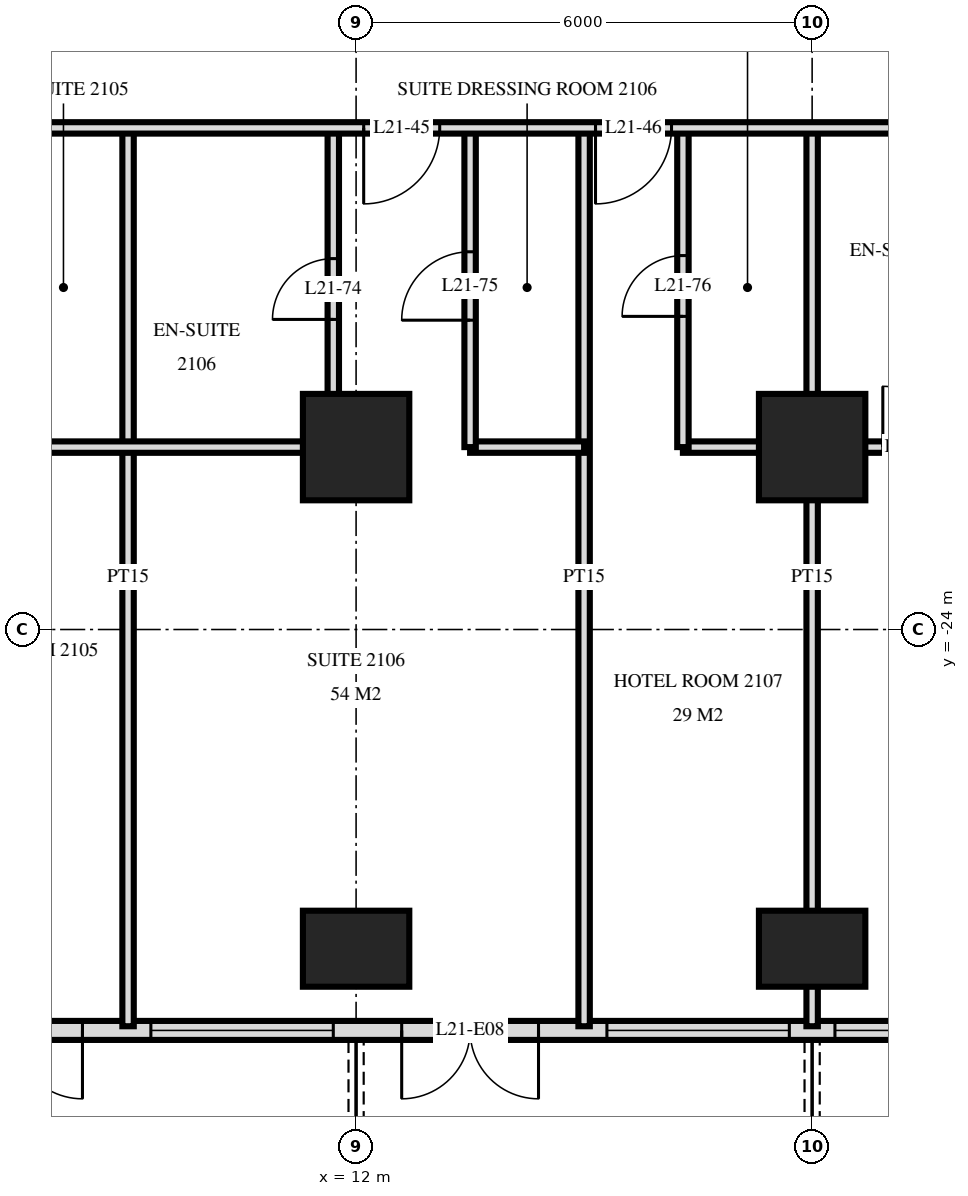
"""IFC4 building model, lengths in metres.
Left out: names, types, materials, properties, quantities, classifications, styles, units other than length and angle.
Written with IfcOpenShell. Run it as: python <this file> out.ifc"""

import sys

from ifc_helpers import new_model, si_unit, direction, frame, frame_2d, origin, origin_2d, place, context, subcontext, project, spatial, rectangle, extrude, element, fill, save


model = new_model("IFC4")
c1 = context("Model", 3, precision=1e-05, world=origin(), true_north=direction((0.0, 1.0)))
c2 = subcontext(c1, "Body", "Model", "MODEL_VIEW")
j1 = project(units=[si_unit("LENGTHUNIT", "METRE"), si_unit("PLANEANGLEUNIT", "RADIAN")], contexts=[c1])
p1 = place(None, origin())
s1 = spatial("IfcSite", under=j1, at=p1, CompositionType="ELEMENT")
p2 = place(p1, origin())
s2 = spatial("IfcBuilding", under=s1, at=p2, CompositionType="ELEMENT")
p3 = place(p2, frame((0.0, 0.0, 85.2)))
s3 = spatial("IfcBuildingStorey", under=s2, at=p3, CompositionType="ELEMENT", Elevation=85.2)
p4 = place(p3, frame((12.0, -28.2, 0.0), z_axis=(0.0, 0.0, 1.0), x_axis=(1.0, 0.0, 0.0)))
e1 = element("IfcColumn", 1, at=p4, inside=s3, PredefinedType="COLUMN", context=c2, shape_type="SweptSolid", body=[
    extrude(rectangle(XDim=1.4, YDim=1.0, at=origin_2d()), origin(), (0.0, 0.0, 1.0), 3.6),
])
p5 = place(p3, frame((12.0, -21.6, 0.0), z_axis=(0.0, 0.0, 1.0), x_axis=(1.0, 0.0, 0.0)))
e2 = element("IfcColumn", 2, at=p5, inside=s3, PredefinedType="COLUMN", context=c2, shape_type="SweptSolid", body=[
    extrude(rectangle(XDim=1.4, YDim=1.4, at=origin_2d()), origin(), (0.0, 0.0, 1.0), 3.6),
])
p6 = place(p3, frame((18.0, -28.2, 0.0), z_axis=(0.0, 0.0, 1.0), x_axis=(1.0, 0.0, 0.0)))
e3 = element("IfcColumn", 3, at=p6, inside=s3, PredefinedType="COLUMN", context=c2, shape_type="SweptSolid", body=[
    extrude(rectangle(XDim=1.4, YDim=1.0, at=origin_2d()), origin(), (0.0, 0.0, 1.0), 3.6),
])
p7 = place(p3, frame((18.0, -21.6, 0.0), z_axis=(0.0, 0.0, 1.0), x_axis=(1.0, 0.0, 0.0)))
e4 = element("IfcColumn", 4, at=p7, inside=s3, PredefinedType="COLUMN", context=c2, shape_type="SweptSolid", body=[
    extrude(rectangle(XDim=1.4, YDim=1.4, at=origin_2d()), origin(), (0.0, 0.0, 1.0), 3.6),
])
p8 = place(p3, frame((-28.775, -29.275, 0.0), z_axis=(0.0, 0.0, 1.0), x_axis=(1.0, 0.0, 0.0)))
e5 = element("IfcWall", 5, at=p8, inside=s3, PredefinedType="SOLIDWALL", context=c2, shape_type="SweptSolid", body=[
    extrude(rectangle(XDim=57.551, YDim=0.25, at=frame_2d((28.775, 0.0))), origin(), (0.0, 0.0, 1.0), 3.32),
])
p9 = place(p8, frame((0.575, 0.0, 0.0)))
e6 = element("IfcOpeningElement", 6, at=p9, cuts=e5, PredefinedType="OPENING", context=c2, shape_type="SweptSolid", body=[
    extrude(rectangle(XDim=1.8, YDim=2.4, at=frame_2d((0.9, 1.2))), frame((0.0, 0.135, 0.0), z_axis=(0.0, -1.0, 0.0), x_axis=(1.0, 0.0, 0.0)), (0.0, 0.0, 1.0), 0.27),
])
p10 = place(p8, frame((5.375, 0.0, 0.0)))
e7 = element("IfcOpeningElement", 7, at=p10, cuts=e5, PredefinedType="OPENING", context=c2, shape_type="SweptSolid", body=[
    extrude(rectangle(XDim=1.8, YDim=2.4, at=frame_2d((0.9, 1.2))), frame((0.0, 0.135, 0.0), z_axis=(0.0, -1.0, 0.0), x_axis=(1.0, 0.0, 0.0)), (0.0, 0.0, 1.0), 0.27),
])
p11 = place(p8, frame((8.075, 0.0, 0.3)))
e8 = element("IfcOpeningElement", 8, at=p11, cuts=e5, PredefinedType="OPENING", context=c2, shape_type="SweptSolid", body=[
    extrude(rectangle(XDim=2.4, YDim=2.1, at=frame_2d((1.2, 1.05))), frame((0.0, 0.135, 0.0), z_axis=(0.0, -1.0, 0.0), x_axis=(1.0, 0.0, 0.0)), (0.0, 0.0, 1.0), 0.27),
])
p12 = place(p8, frame((11.375, 0.0, 0.0)))
e9 = element("IfcOpeningElement", 9, at=p12, cuts=e5, PredefinedType="OPENING", context=c2, shape_type="SweptSolid", body=[
    extrude(rectangle(XDim=1.8, YDim=2.4, at=frame_2d((0.9, 1.2))), frame((0.0, 0.135, 0.0), z_axis=(0.0, -1.0, 0.0), x_axis=(1.0, 0.0, 0.0)), (0.0, 0.0, 1.0), 0.27),
])
p13 = place(p8, frame((14.075, 0.0, 0.3)))
e10 = element("IfcOpeningElement", 10, at=p13, cuts=e5, PredefinedType="OPENING", context=c2, shape_type="SweptSolid", body=[
    extrude(rectangle(XDim=2.4, YDim=2.1, at=frame_2d((1.2, 1.05))), frame((0.0, 0.135, 0.0), z_axis=(0.0, -1.0, 0.0), x_axis=(1.0, 0.0, 0.0)), (0.0, 0.0, 1.0), 0.27),
])
p14 = place(p8, frame((17.075, 0.0, 0.3)))
e11 = element("IfcOpeningElement", 11, at=p14, cuts=e5, PredefinedType="OPENING", context=c2, shape_type="SweptSolid", body=[
    extrude(rectangle(XDim=2.4, YDim=2.1, at=frame_2d((1.2, 1.05))), frame((0.0, 0.135, 0.0), z_axis=(0.0, -1.0, 0.0), x_axis=(1.0, 0.0, 0.0)), (0.0, 0.0, 1.0), 0.27),
])
p15 = place(p8, frame((20.375, 0.0, 0.0)))
e12 = element("IfcOpeningElement", 12, at=p15, cuts=e5, PredefinedType="OPENING", context=c2, shape_type="SweptSolid", body=[
    extrude(rectangle(XDim=1.8, YDim=2.4, at=frame_2d((0.9, 1.2))), frame((0.0, 0.135, 0.0), z_axis=(0.0, -1.0, 0.0), x_axis=(1.0, 0.0, 0.0)), (0.0, 0.0, 1.0), 0.27),
])
p16 = place(p8, frame((23.375, 0.0, 0.0)))
e13 = element("IfcOpeningElement", 13, at=p16, cuts=e5, PredefinedType="OPENING", context=c2, shape_type="SweptSolid", body=[
    extrude(rectangle(XDim=1.8, YDim=2.4, at=frame_2d((0.9, 1.2))), frame((0.0, 0.135, 0.0), z_axis=(0.0, -1.0, 0.0), x_axis=(1.0, 0.0, 0.0)), (0.0, 0.0, 1.0), 0.27),
])
p17 = place(p8, frame((26.075, 0.0, 0.3)))
e14 = element("IfcOpeningElement", 14, at=p17, cuts=e5, PredefinedType="OPENING", context=c2, shape_type="SweptSolid", body=[
    extrude(rectangle(XDim=2.4, YDim=2.1, at=frame_2d((1.2, 1.05))), frame((0.0, 0.135, 0.0), z_axis=(0.0, -1.0, 0.0), x_axis=(1.0, 0.0, 0.0)), (0.0, 0.0, 1.0), 0.27),
])
p18 = place(p8, frame((29.375, 0.0, 0.0)))
e15 = element("IfcOpeningElement", 15, at=p18, cuts=e5, PredefinedType="OPENING", context=c2, shape_type="SweptSolid", body=[
    extrude(rectangle(XDim=1.8, YDim=2.4, at=frame_2d((0.9, 1.2))), frame((0.0, 0.135, 0.0), z_axis=(0.0, -1.0, 0.0), x_axis=(1.0, 0.0, 0.0)), (0.0, 0.0, 1.0), 0.27),
])
p19 = place(p8, frame((32.075, 0.0, 0.3)))
e16 = element("IfcOpeningElement", 16, at=p19, cuts=e5, PredefinedType="OPENING", context=c2, shape_type="SweptSolid", body=[
    extrude(rectangle(XDim=2.4, YDim=2.1, at=frame_2d((1.2, 1.05))), frame((0.0, 0.135, 0.0), z_axis=(0.0, -1.0, 0.0), x_axis=(1.0, 0.0, 0.0)), (0.0, 0.0, 1.0), 0.27),
])
p20 = place(p8, frame((35.375, 0.0, 0.0)))
e17 = element("IfcOpeningElement", 17, at=p20, cuts=e5, PredefinedType="OPENING", context=c2, shape_type="SweptSolid", body=[
    extrude(rectangle(XDim=1.8, YDim=2.4, at=frame_2d((0.9, 1.2))), frame((0.0, 0.135, 0.0), z_axis=(0.0, -1.0, 0.0), x_axis=(1.0, 0.0, 0.0)), (0.0, 0.0, 1.0), 0.27),
])
p21 = place(p8, frame((38.075, 0.0, 0.3)))
e18 = element("IfcOpeningElement", 18, at=p21, cuts=e5, PredefinedType="OPENING", context=c2, shape_type="SweptSolid", body=[
    extrude(rectangle(XDim=2.4, YDim=2.1, at=frame_2d((1.2, 1.05))), frame((0.0, 0.135, 0.0), z_axis=(0.0, -1.0, 0.0), x_axis=(1.0, 0.0, 0.0)), (0.0, 0.0, 1.0), 0.27),
])
p22 = place(p8, frame((41.375, 0.0, 0.0)))
e19 = element("IfcOpeningElement", 19, at=p22, cuts=e5, PredefinedType="OPENING", context=c2, shape_type="SweptSolid", body=[
    extrude(rectangle(XDim=1.8, YDim=2.4, at=frame_2d((0.9, 1.2))), frame((0.0, 0.135, 0.0), z_axis=(0.0, -1.0, 0.0), x_axis=(1.0, 0.0, 0.0)), (0.0, 0.0, 1.0), 0.27),
])
p23 = place(p8, frame((44.075, 0.0, 0.3)))
e20 = element("IfcOpeningElement", 20, at=p23, cuts=e5, PredefinedType="OPENING", context=c2, shape_type="SweptSolid", body=[
    extrude(rectangle(XDim=2.4, YDim=2.1, at=frame_2d((1.2, 1.05))), frame((0.0, 0.135, 0.0), z_axis=(0.0, -1.0, 0.0), x_axis=(1.0, 0.0, 0.0)), (0.0, 0.0, 1.0), 0.27),
])
p24 = place(p8, frame((47.075, 0.0, 0.3)))
e21 = element("IfcOpeningElement", 21, at=p24, cuts=e5, PredefinedType="OPENING", context=c2, shape_type="SweptSolid", body=[
    extrude(rectangle(XDim=2.4, YDim=2.1, at=frame_2d((1.2, 1.05))), frame((0.0, 0.135, 0.0), z_axis=(0.0, -1.0, 0.0), x_axis=(1.0, 0.0, 0.0)), (0.0, 0.0, 1.0), 0.27),
])
p25 = place(p8, frame((50.375, 0.0, 0.0)))
e22 = element("IfcOpeningElement", 22, at=p25, cuts=e5, PredefinedType="OPENING", context=c2, shape_type="SweptSolid", body=[
    extrude(rectangle(XDim=1.8, YDim=2.4, at=frame_2d((0.9, 1.2))), frame((0.0, 0.135, 0.0), z_axis=(0.0, -1.0, 0.0), x_axis=(1.0, 0.0, 0.0)), (0.0, 0.0, 1.0), 0.27),
])
p26 = place(p8, frame((53.375, 0.0, 0.0)))
e23 = element("IfcOpeningElement", 23, at=p26, cuts=e5, PredefinedType="OPENING", context=c2, shape_type="SweptSolid", body=[
    extrude(rectangle(XDim=1.8, YDim=2.4, at=frame_2d((0.9, 1.2))), frame((0.0, 0.135, 0.0), z_axis=(0.0, -1.0, 0.0), x_axis=(1.0, 0.0, 0.0)), (0.0, 0.0, 1.0), 0.27),
])
p27 = place(p3, frame((18.0, -29.22, 0.0), z_axis=(0.0, 0.0, 1.0), x_axis=(0.0, 1.0, 0.0)))
e24 = element("IfcWall", 24, at=p27, inside=s3, PredefinedType="PARTITIONING", context=c2, shape_type="SweptSolid", body=[
    extrude(rectangle(XDim=11.82, YDim=0.15, at=frame_2d((5.91, 0.0))), origin(), (0.0, 0.0, 1.0), 3.32),
])
p28 = place(p3, frame((16.3, -21.6, 0.0), z_axis=(0.0, 0.0, 1.0), x_axis=(0.0, 1.0, 0.0)))
e25 = element("IfcWall", 25, at=p28, inside=s3, PredefinedType="PARTITIONING", context=c2, shape_type="SweptSolid", body=[
    extrude(rectangle(XDim=4.2, YDim=0.15, at=frame_2d((2.1, 0.0))), origin(), (0.0, 0.0, 1.0), 3.32),
])
p29 = place(p28, frame((1.72, 0.0, 0.0)))
e26 = element("IfcOpeningElement", 26, at=p29, cuts=e25, PredefinedType="OPENING", context=c2, shape_type="SweptSolid", body=[
    extrude(rectangle(XDim=0.8, YDim=2.1, at=frame_2d((0.4, 1.05))), frame((0.0, 0.085, 0.0), z_axis=(0.0, -1.0, 0.0), x_axis=(1.0, 0.0, 0.0)), (0.0, 0.0, 1.0), 0.17),
])
p30 = place(p3, frame((15.0, -29.22, 0.0), z_axis=(0.0, 0.0, 1.0), x_axis=(0.0, 1.0, 0.0)))
e27 = element("IfcWall", 27, at=p30, inside=s3, PredefinedType="PARTITIONING", context=c2, shape_type="SweptSolid", body=[
    extrude(rectangle(XDim=11.82, YDim=0.15, at=frame_2d((5.91, 0.0))), origin(), (0.0, 0.0, 1.0), 3.32),
])
p31 = place(p3, frame((13.5, -21.6, 0.0), z_axis=(0.0, 0.0, 1.0), x_axis=(0.0, 1.0, 0.0)))
e28 = element("IfcWall", 28, at=p31, inside=s3, PredefinedType="PARTITIONING", context=c2, shape_type="SweptSolid", body=[
    extrude(rectangle(XDim=4.2, YDim=0.15, at=frame_2d((2.1, 0.0))), origin(), (0.0, 0.0, 1.0), 3.32),
])
p32 = place(p31, frame((1.67, 0.0, 0.0)))
e29 = element("IfcOpeningElement", 29, at=p32, cuts=e28, PredefinedType="OPENING", context=c2, shape_type="SweptSolid", body=[
    extrude(rectangle(XDim=0.9, YDim=2.1, at=frame_2d((0.45, 1.05))), frame((0.0, 0.085, 0.0), z_axis=(0.0, -1.0, 0.0), x_axis=(1.0, 0.0, 0.0)), (0.0, 0.0, 1.0), 0.17),
])
p33 = place(p3, frame((11.7, -21.6, 0.0), z_axis=(0.0, 0.0, 1.0), x_axis=(0.0, 1.0, 0.0)))
e30 = element("IfcWall", 30, at=p33, inside=s3, PredefinedType="PARTITIONING", context=c2, shape_type="SweptSolid", body=[
    extrude(rectangle(XDim=4.2, YDim=0.15, at=frame_2d((2.1, 0.0))), origin(), (0.0, 0.0, 1.0), 3.32),
])
p34 = place(p33, frame((1.68, 0.0, 0.0)))
e31 = element("IfcOpeningElement", 31, at=p34, cuts=e30, PredefinedType="OPENING", context=c2, shape_type="SweptSolid", body=[
    extrude(rectangle(XDim=0.8, YDim=2.1, at=frame_2d((0.4, 1.05))), frame((0.0, 0.085, 0.0), z_axis=(0.0, -1.0, 0.0), x_axis=(1.0, 0.0, 0.0)), (0.0, 0.0, 1.0), 0.17),
])
p35 = place(p3, frame((9.0, -29.22, 0.0), z_axis=(0.0, 0.0, 1.0), x_axis=(0.0, 1.0, 0.0)))
e32 = element("IfcWall", 32, at=p35, inside=s3, PredefinedType="PARTITIONING", context=c2, shape_type="SweptSolid", body=[
    extrude(rectangle(XDim=11.82, YDim=0.15, at=frame_2d((5.91, 0.0))), origin(), (0.0, 0.0, 1.0), 3.32),
])
p36 = place(p3, frame((7.3, -21.6, 0.0), z_axis=(0.0, 0.0, 1.0), x_axis=(1.0, 0.0, 0.0)))
e33 = element("IfcWall", 33, at=p36, inside=s3, PredefinedType="PARTITIONING", context=c2, shape_type="SweptSolid", body=[
    extrude(rectangle(XDim=4.4, YDim=0.15, at=frame_2d((2.2, 0.0))), origin(), (0.0, 0.0, 1.0), 3.32),
])
p37 = place(p3, frame((13.5, -21.6, 0.0), z_axis=(0.0, 0.0, 1.0), x_axis=(1.0, 0.0, 0.0)))
e34 = element("IfcWall", 34, at=p37, inside=s3, PredefinedType="PARTITIONING", context=c2, shape_type="SweptSolid", body=[
    extrude(rectangle(XDim=1.5, YDim=0.15, at=frame_2d((0.75, 0.0))), origin(), (0.0, 0.0, 1.0), 3.32),
])
p38 = place(p3, frame((16.3, -21.6, 0.0), z_axis=(0.0, 0.0, 1.0), x_axis=(1.0, 0.0, 0.0)))
e35 = element("IfcWall", 35, at=p38, inside=s3, PredefinedType="PARTITIONING", context=c2, shape_type="SweptSolid", body=[
    extrude(rectangle(XDim=5.9, YDim=0.15, at=frame_2d((2.95, 0.0))), origin(), (0.0, 0.0, 1.0), 3.32),
])
p39 = place(p38, frame((2.63, 0.0, 0.0)))
e36 = element("IfcOpeningElement", 36, at=p39, cuts=e35, PredefinedType="OPENING", context=c2, shape_type="SweptSolid", body=[
    extrude(rectangle(XDim=0.8, YDim=2.1, at=frame_2d((0.4, 1.05))), frame((0.0, 0.085, 0.0), z_axis=(0.0, -1.0, 0.0), x_axis=(1.0, 0.0, 0.0)), (0.0, 0.0, 1.0), 0.17),
])
p40 = place(p3, frame((-33.12, -17.4, 0.0), z_axis=(0.0, 0.0, 1.0), x_axis=(1.0, 0.0, 0.0)))
e37 = element("IfcWall", 37, at=p40, inside=s3, PredefinedType="PARTITIONING", context=c2, shape_type="SweptSolid", body=[
    extrude(rectangle(XDim=66.24, YDim=0.15, at=frame_2d((33.12, 0.0))), origin(), (0.0, 0.0, 1.0), 3.32),
])
p41 = place(p40, frame((10.27, 0.0, 0.0)))
e38 = element("IfcOpeningElement", 38, at=p41, cuts=e37, PredefinedType="OPENING", context=c2, shape_type="SweptSolid", body=[
    extrude(rectangle(XDim=1.0, YDim=2.1, at=frame_2d((0.5, 1.05))), frame((0.0, 0.085, 0.0), z_axis=(0.0, -1.0, 0.0), x_axis=(1.0, 0.0, 0.0)), (0.0, 0.0, 1.0), 0.17),
])
p42 = place(p40, frame((16.97, 0.0, 0.0)))
e39 = element("IfcOpeningElement", 39, at=p42, cuts=e37, PredefinedType="OPENING", context=c2, shape_type="SweptSolid", body=[
    extrude(rectangle(XDim=1.0, YDim=2.1, at=frame_2d((0.5, 1.05))), frame((0.0, 0.085, 0.0), z_axis=(0.0, -1.0, 0.0), x_axis=(1.0, 0.0, 0.0)), (0.0, 0.0, 1.0), 0.17),
])
p43 = place(p40, frame((28.42, 0.0, 0.0)))
e40 = element("IfcOpeningElement", 40, at=p43, cuts=e37, PredefinedType="OPENING", context=c2, shape_type="SweptSolid", body=[
    extrude(rectangle(XDim=1.0, YDim=2.1, at=frame_2d((0.5, 1.05))), frame((0.0, 0.085, 0.0), z_axis=(0.0, -1.0, 0.0), x_axis=(1.0, 0.0, 0.0)), (0.0, 0.0, 1.0), 0.17),
])
p44 = place(p40, frame((30.82, 0.0, 0.0)))
e41 = element("IfcOpeningElement", 41, at=p44, cuts=e37, PredefinedType="OPENING", context=c2, shape_type="SweptSolid", body=[
    extrude(rectangle(XDim=1.0, YDim=2.1, at=frame_2d((0.5, 1.05))), frame((0.0, 0.085, 0.0), z_axis=(0.0, -1.0, 0.0), x_axis=(1.0, 0.0, 0.0)), (0.0, 0.0, 1.0), 0.17),
])
p45 = place(p40, frame((39.27, 0.0, 0.0)))
e42 = element("IfcOpeningElement", 42, at=p45, cuts=e37, PredefinedType="OPENING", context=c2, shape_type="SweptSolid", body=[
    extrude(rectangle(XDim=1.0, YDim=2.1, at=frame_2d((0.5, 1.05))), frame((0.0, 0.085, 0.0), z_axis=(0.0, -1.0, 0.0), x_axis=(1.0, 0.0, 0.0)), (0.0, 0.0, 1.0), 0.17),
])
p46 = place(p40, frame((45.22, 0.0, 0.0)))
e43 = element("IfcOpeningElement", 43, at=p46, cuts=e37, PredefinedType="OPENING", context=c2, shape_type="SweptSolid", body=[
    extrude(rectangle(XDim=1.0, YDim=2.1, at=frame_2d((0.5, 1.05))), frame((0.0, 0.085, 0.0), z_axis=(0.0, -1.0, 0.0), x_axis=(1.0, 0.0, 0.0)), (0.0, 0.0, 1.0), 0.17),
])
p47 = place(p40, frame((48.27, 0.0, 0.0)))
e44 = element("IfcOpeningElement", 44, at=p47, cuts=e37, PredefinedType="OPENING", context=c2, shape_type="SweptSolid", body=[
    extrude(rectangle(XDim=1.0, YDim=2.1, at=frame_2d((0.5, 1.05))), frame((0.0, 0.085, 0.0), z_axis=(0.0, -1.0, 0.0), x_axis=(1.0, 0.0, 0.0)), (0.0, 0.0, 1.0), 0.17),
])
p48 = place(p40, frame((1.87, 0.0, 0.0)))
e45 = element("IfcOpeningElement", 45, at=p48, cuts=e37, PredefinedType="OPENING", context=c2, shape_type="SweptSolid", body=[
    extrude(rectangle(XDim=1.0, YDim=2.1, at=frame_2d((0.5, 1.05))), frame((0.0, 0.085, 0.0), z_axis=(0.0, -1.0, 0.0), x_axis=(1.0, 0.0, 0.0)), (0.0, 0.0, 1.0), 0.17),
])
p49 = place(p40, frame((60.37, 0.0, 0.0)))
e46 = element("IfcOpeningElement", 46, at=p49, cuts=e37, PredefinedType="OPENING", context=c2, shape_type="SweptSolid", body=[
    extrude(rectangle(XDim=1.0, YDim=2.1, at=frame_2d((0.5, 1.05))), frame((0.0, 0.085, 0.0), z_axis=(0.0, -1.0, 0.0), x_axis=(1.0, 0.0, 0.0)), (0.0, 0.0, 1.0), 0.17),
])
p50 = place(p20, frame((0.9, 0.0, 0.0), z_axis=(0.0, 0.0, 1.0), x_axis=(-1.0, 0.0, 0.0)))
e47 = element("IfcDoor", 47, at=p50, inside=s3, OperationType="DOUBLE_DOOR_SINGLE_SWING", PredefinedType="DOOR", context=c2, shape_type="SweptSolid", body=[
    extrude(rectangle(XDim=1.8, YDim=2.4, at=frame_2d((0.0, 1.2))), frame((0.0, -0.025, 0.0), z_axis=(0.0, 1.0, 0.0), x_axis=(-1.0, 0.0, 0.0)), (0.0, 0.0, 1.0), 0.05),
])
fill(e17, e47)
p51 = place(p21, origin())
e48 = element("IfcWindow", 48, at=p51, inside=s3, PartitioningType="SINGLE_PANEL", PredefinedType="WINDOW", context=c2, shape_type="SweptSolid", body=[
    extrude(rectangle(XDim=2.4, YDim=2.1, at=frame_2d((1.2, 1.05))), frame((0.0, 0.03, 0.0), z_axis=(0.0, -1.0, 0.0), x_axis=(1.0, 0.0, 0.0)), (0.0, 0.0, 1.0), 0.06),
])
fill(e18, e48)
p52 = place(p22, frame((0.9, 0.0, 0.0), z_axis=(0.0, 0.0, 1.0), x_axis=(-1.0, 0.0, 0.0)))
e49 = element("IfcDoor", 49, at=p52, inside=s3, OperationType="DOUBLE_DOOR_SINGLE_SWING", PredefinedType="DOOR", context=c2, shape_type="SweptSolid", body=[
    extrude(rectangle(XDim=1.8, YDim=2.4, at=frame_2d((0.0, 1.2))), frame((0.0, -0.025, 0.0), z_axis=(0.0, 1.0, 0.0), x_axis=(-1.0, 0.0, 0.0)), (0.0, 0.0, 1.0), 0.05),
])
fill(e19, e49)
p53 = place(p23, origin())
e50 = element("IfcWindow", 50, at=p53, inside=s3, PartitioningType="SINGLE_PANEL", PredefinedType="WINDOW", context=c2, shape_type="SweptSolid", body=[
    extrude(rectangle(XDim=2.4, YDim=2.1, at=frame_2d((1.2, 1.05))), frame((0.0, 0.03, 0.0), z_axis=(0.0, -1.0, 0.0), x_axis=(1.0, 0.0, 0.0)), (0.0, 0.0, 1.0), 0.06),
])
fill(e20, e50)
p54 = place(p24, origin())
e51 = element("IfcWindow", 51, at=p54, inside=s3, PartitioningType="SINGLE_PANEL", PredefinedType="WINDOW", context=c2, shape_type="SweptSolid", body=[
    extrude(rectangle(XDim=2.4, YDim=2.1, at=frame_2d((1.2, 1.05))), frame((0.0, 0.03, 0.0), z_axis=(0.0, -1.0, 0.0), x_axis=(1.0, 0.0, 0.0)), (0.0, 0.0, 1.0), 0.06),
])
fill(e21, e51)
p55 = place(p46, frame((0.5, 0.0, 0.0), z_axis=(0.0, 0.0, 1.0), x_axis=(-1.0, 0.0, 0.0)))
e52 = element("IfcDoor", 52, at=p55, inside=s3, OperationType="SINGLE_SWING_LEFT", PredefinedType="DOOR", context=c2, shape_type="SweptSolid", body=[
    extrude(rectangle(XDim=1.0, YDim=2.1, at=frame_2d((0.0, 1.05))), frame((0.0, -0.025, 0.0), z_axis=(0.0, 1.0, 0.0), x_axis=(-1.0, 0.0, 0.0)), (0.0, 0.0, 1.0), 0.05),
])
fill(e43, e52)
p56 = place(p47, frame((0.5, 0.0, 0.0), z_axis=(0.0, 0.0, 1.0), x_axis=(-1.0, 0.0, 0.0)))
e53 = element("IfcDoor", 53, at=p56, inside=s3, OperationType="SINGLE_SWING_LEFT", PredefinedType="DOOR", context=c2, shape_type="SweptSolid", body=[
    extrude(rectangle(XDim=1.0, YDim=2.1, at=frame_2d((0.0, 1.05))), frame((0.0, -0.025, 0.0), z_axis=(0.0, 1.0, 0.0), x_axis=(-1.0, 0.0, 0.0)), (0.0, 0.0, 1.0), 0.05),
])
fill(e44, e53)
p57 = place(p34, origin())
e54 = element("IfcDoor", 54, at=p57, inside=s3, OperationType="SINGLE_SWING_RIGHT", PredefinedType="DOOR", context=c2, shape_type="SweptSolid", body=[
    extrude(rectangle(XDim=0.8, YDim=2.1, at=frame_2d((0.4, 1.05))), frame((0.0, 0.025, 0.0), z_axis=(0.0, -1.0, 0.0), x_axis=(1.0, 0.0, 0.0)), (0.0, 0.0, 1.0), 0.05),
])
fill(e31, e54)
p58 = place(p32, origin())
e55 = element("IfcDoor", 55, at=p58, inside=s3, OperationType="SINGLE_SWING_RIGHT", PredefinedType="DOOR", context=c2, shape_type="SweptSolid", body=[
    extrude(rectangle(XDim=0.9, YDim=2.1, at=frame_2d((0.45, 1.05))), frame((0.0, 0.025, 0.0), z_axis=(0.0, -1.0, 0.0), x_axis=(1.0, 0.0, 0.0)), (0.0, 0.0, 1.0), 0.05),
])
fill(e29, e55)
p59 = place(p29, origin())
e56 = element("IfcDoor", 56, at=p59, inside=s3, OperationType="SINGLE_SWING_RIGHT", PredefinedType="DOOR", context=c2, shape_type="SweptSolid", body=[
    extrude(rectangle(XDim=0.8, YDim=2.1, at=frame_2d((0.4, 1.05))), frame((0.0, 0.025, 0.0), z_axis=(0.0, -1.0, 0.0), x_axis=(1.0, 0.0, 0.0)), (0.0, 0.0, 1.0), 0.05),
])
fill(e26, e56)
p60 = place(p39, origin())
e57 = element("IfcDoor", 57, at=p60, inside=s3, OperationType="SINGLE_SWING_RIGHT", PredefinedType="DOOR", context=c2, shape_type="SweptSolid", body=[
    extrude(rectangle(XDim=0.8, YDim=2.1, at=frame_2d((0.4, 1.05))), frame((0.0, 0.025, 0.0), z_axis=(0.0, -1.0, 0.0), x_axis=(1.0, 0.0, 0.0)), (0.0, 0.0, 1.0), 0.05),
])
fill(e36, e57)
save(model, sys.argv[1])
